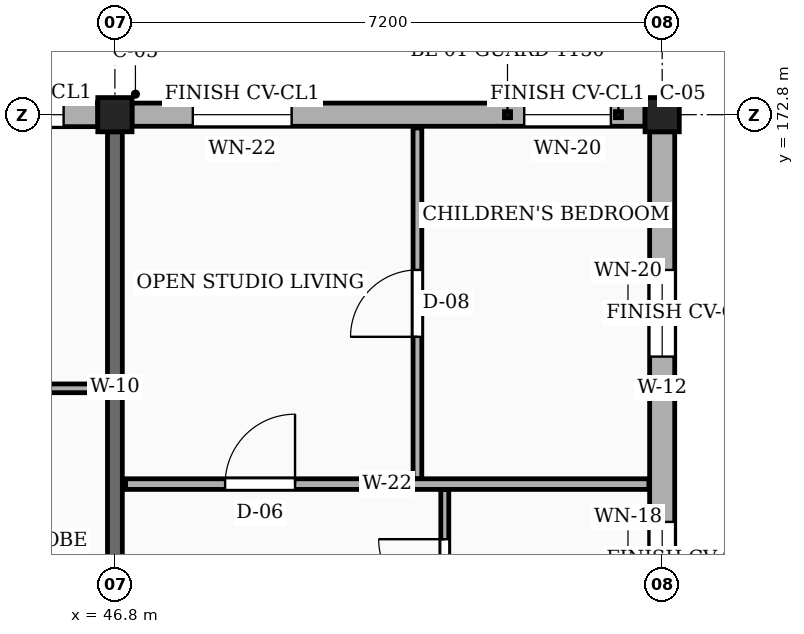
"""IFC4 building model, lengths in metres.
Left out: names, types, materials, properties, quantities, classifications, styles, units other than length and angle.
Written with IfcOpenShell. Run it as: python <this file> out.ifc"""

import sys

from ifc_helpers import new_model, si_unit, direction, frame, frame_2d, origin, origin_2d, place, context, subcontext, project, spatial, rectangle, extrude, element, fill, save


model = new_model("IFC4")
c1 = context("Model", 3, precision=1e-05, world=origin(), true_north=direction((0.0, 1.0)))
c2 = subcontext(c1, "Body", "Model", "MODEL_VIEW")
j1 = project(units=[si_unit("LENGTHUNIT", "METRE"), si_unit("PLANEANGLEUNIT", "RADIAN")], contexts=[c1])
p1 = place(None, origin())
s1 = spatial("IfcSite", under=j1, at=p1, CompositionType="ELEMENT")
p2 = place(p1, origin())
s2 = spatial("IfcBuilding", under=s1, at=p2, CompositionType="ELEMENT")
p3 = place(p2, frame((0.0, 0.0, 39.15)))
s3 = spatial("IfcBuildingStorey", under=s2, at=p3, CompositionType="ELEMENT", Elevation=39.15)
for number, where, z_axis, x_axis in (
    (1, (46.8, 172.8, 0.0), (0.0, 0.0, 1.0), (1.0, 0.0, 0.0)),
    (2, (54.0, 172.8, 0.0), (0.0, 0.0, 1.0), (1.0, 0.0, 0.0)),
):
    element("IfcColumn", number, at=place(p3, frame(where, z_axis=z_axis, x_axis=x_axis)), inside=s3, PredefinedType="COLUMN", context=c2, shape_type="SweptSolid", body=[
        extrude(rectangle(XDim=0.45, YDim=0.45, at=origin_2d()), origin(), (0.0, 0.0, 1.0), 3.15),
    ])
p4 = place(p3, frame((46.8, 165.85, 0.0), z_axis=(0.0, 0.0, 1.0), x_axis=(0.0, 1.0, 0.0)))
e3 = element("IfcWall", 3, at=p4, inside=s3, PredefinedType="SOLIDWALL", context=c2, shape_type="SweptSolid", body=[
    extrude(rectangle(XDim=6.725, YDim=0.195, at=frame_2d((3.362, 0.0))), origin(), (0.0, 0.0, 1.0), 2.185),
])
p5 = place(p3, frame((54.0, 165.825, 0.0), z_axis=(0.0, 0.0, 1.0), x_axis=(0.0, 1.0, 0.0)))
e4 = element("IfcWall", 4, at=p5, inside=s3, PredefinedType="SOLIDWALL", context=c2, shape_type="SweptSolid", body=[
    extrude(rectangle(XDim=6.75, YDim=0.33, at=frame_2d((3.375, 0.0))), origin(), (0.0, 0.0, 1.0), 2.455),
])
p6 = place(p5, frame((0.637, 0.0, 0.78)))
e5 = element("IfcOpeningElement", 5, at=p6, cuts=e4, PredefinedType="OPENING", context=c2, shape_type="SweptSolid", body=[
    extrude(rectangle(XDim=0.98, YDim=1.36, at=frame_2d((0.49, 0.68))), frame((0.0, 0.175, 0.0), z_axis=(0.0, -1.0, 0.0), x_axis=(1.0, 0.0, 0.0)), (0.0, 0.0, 1.0), 0.35),
])
p7 = place(p5, frame((3.792, 0.0, 0.78)))
e6 = element("IfcOpeningElement", 6, at=p7, cuts=e4, PredefinedType="OPENING", context=c2, shape_type="SweptSolid", body=[
    extrude(rectangle(XDim=1.14, YDim=1.36, at=frame_2d((0.57, 0.68))), frame((0.0, 0.175, 0.0), z_axis=(0.0, -1.0, 0.0), x_axis=(1.0, 0.0, 0.0)), (0.0, 0.0, 1.0), 0.35),
])
p8 = place(p3, frame((53.775, 172.8, 0.0), z_axis=(0.0, 0.0, 1.0), x_axis=(-1.0, 0.0, 0.0)))
e7 = element("IfcWall", 7, at=p8, inside=s3, PredefinedType="SOLIDWALL", context=c2, shape_type="SweptSolid", body=[
    extrude(rectangle(XDim=6.75, YDim=0.305, at=frame_2d((3.375, 0.0))), origin(), (0.0, 0.0, 1.0), 2.455),
])
p9 = place(p8, frame((0.45, 0.0, 0.78)))
e8 = element("IfcOpeningElement", 8, at=p9, cuts=e7, PredefinedType="OPENING", context=c2, shape_type="SweptSolid", body=[
    extrude(rectangle(XDim=1.14, YDim=1.36, at=frame_2d((0.57, 0.68))), frame((0.0, 0.163, 0.0), z_axis=(0.0, -1.0, 0.0), x_axis=(1.0, 0.0, 0.0)), (0.0, 0.0, 1.0), 0.325),
])
p10 = place(p8, frame((4.65, 0.0, 0.78)))
e9 = element("IfcOpeningElement", 9, at=p10, cuts=e7, PredefinedType="OPENING", context=c2, shape_type="SweptSolid", body=[
    extrude(rectangle(XDim=1.3, YDim=1.36, at=frame_2d((0.65, 0.68))), frame((0.0, 0.163, 0.0), z_axis=(0.0, -1.0, 0.0), x_axis=(1.0, 0.0, 0.0)), (0.0, 0.0, 1.0), 0.325),
])
p11 = place(p3, frame((46.575, 172.8, 0.0), z_axis=(0.0, 0.0, 1.0), x_axis=(-1.0, 0.0, 0.0)))
e10 = element("IfcWall", 10, at=p11, inside=s3, PredefinedType="SOLIDWALL", context=c2, shape_type="SweptSolid", body=[
    extrude(rectangle(XDim=6.75, YDim=0.315, at=frame_2d((3.375, 0.0))), origin(), (0.0, 0.0, 1.0), 2.455),
])
p12 = place(p11, frame((0.45, 0.0, 0.78)))
e11 = element("IfcOpeningElement", 11, at=p12, cuts=e10, PredefinedType="OPENING", context=c2, shape_type="SweptSolid", body=[
    extrude(rectangle(XDim=1.3, YDim=1.36, at=frame_2d((0.65, 0.68))), frame((0.0, 0.167, 0.0), z_axis=(0.0, -1.0, 0.0), x_axis=(1.0, 0.0, 0.0)), (0.0, 0.0, 1.0), 0.335),
])
p13 = place(p11, frame((4.65, 0.0, 0.78)))
e12 = element("IfcOpeningElement", 12, at=p13, cuts=e10, PredefinedType="OPENING", context=c2, shape_type="SweptSolid", body=[
    extrude(rectangle(XDim=1.46, YDim=1.36, at=frame_2d((0.73, 0.68))), frame((0.0, 0.167, 0.0), z_axis=(0.0, -1.0, 0.0), x_axis=(1.0, 0.0, 0.0)), (0.0, 0.0, 1.0), 0.335),
])
p14 = place(p3, frame((39.74, 169.2, 0.0), z_axis=(0.0, 0.0, 1.0), x_axis=(1.0, 0.0, 0.0)))
e13 = element("IfcWall", 13, at=p14, inside=s3, PredefinedType="PARTITIONING", context=c2, shape_type="SweptSolid", body=[
    extrude(rectangle(XDim=6.92, YDim=0.115, at=frame_2d((3.46, 0.0))), origin(), (0.0, 0.0, 1.0), 2.32),
])
p15 = place(p14, frame((1.05, 0.0, 0.0)))
e14 = element("IfcOpeningElement", 14, at=p15, cuts=e13, PredefinedType="OPENING", context=c2, shape_type="SweptSolid", body=[
    extrude(rectangle(XDim=0.87, YDim=2.05, at=frame_2d((0.435, 1.025))), frame((0.0, 0.067, 0.0), z_axis=(0.0, -1.0, 0.0), x_axis=(1.0, 0.0, 0.0)), (0.0, 0.0, 1.0), 0.135),
])
p16 = place(p14, frame((4.45, 0.0, 0.0)))
e15 = element("IfcOpeningElement", 15, at=p16, cuts=e13, PredefinedType="OPENING", context=c2, shape_type="SweptSolid", body=[
    extrude(rectangle(XDim=0.88, YDim=2.08, at=frame_2d((0.44, 1.04))), frame((0.0, 0.067, 0.0), z_axis=(0.0, -1.0, 0.0), x_axis=(1.0, 0.0, 0.0)), (0.0, 0.0, 1.0), 0.135),
])
p17 = place(p3, frame((50.78, 168.01, 0.0), z_axis=(0.0, 0.0, 1.0), x_axis=(0.0, 1.0, 0.0)))
e16 = element("IfcWall", 16, at=p17, inside=s3, PredefinedType="PARTITIONING", context=c2, shape_type="SweptSolid", body=[
    extrude(rectangle(XDim=4.615, YDim=0.115, at=frame_2d((2.308, 0.0))), origin(), (0.0, 0.0, 1.0), 2.32),
])
p18 = place(p17, frame((1.867, 0.0, 0.0)))
e17 = element("IfcOpeningElement", 17, at=p18, cuts=e16, PredefinedType="OPENING", context=c2, shape_type="SweptSolid", body=[
    extrude(rectangle(XDim=0.88, YDim=2.08, at=frame_2d((0.44, 1.04))), frame((0.0, 0.067, 0.0), z_axis=(0.0, -1.0, 0.0), x_axis=(1.0, 0.0, 0.0)), (0.0, 0.0, 1.0), 0.135),
])
p19 = place(p3, frame((51.14, 165.69, 0.0), z_axis=(0.0, 0.0, 1.0), x_axis=(0.0, 1.0, 0.0)))
e18 = element("IfcWall", 18, at=p19, inside=s3, PredefinedType="PARTITIONING", context=c2, shape_type="SweptSolid", body=[
    extrude(rectangle(XDim=2.18, YDim=0.105, at=frame_2d((1.09, 0.0))), origin(), (0.0, 0.0, 1.0), 2.32),
])
p20 = place(p19, frame((0.655, 0.0, 0.0)))
e19 = element("IfcOpeningElement", 19, at=p20, cuts=e18, PredefinedType="OPENING", context=c2, shape_type="SweptSolid", body=[
    extrude(rectangle(XDim=0.87, YDim=2.05, at=frame_2d((0.435, 1.025))), frame((0.0, 0.062, 0.0), z_axis=(0.0, -1.0, 0.0), x_axis=(1.0, 0.0, 0.0)), (0.0, 0.0, 1.0), 0.125),
])
p21 = place(p3, frame((46.94, 167.94, 0.0), z_axis=(0.0, 0.0, 1.0), x_axis=(1.0, 0.0, 0.0)))
e20 = element("IfcWall", 20, at=p21, inside=s3, PredefinedType="PARTITIONING", context=c2, shape_type="SweptSolid", body=[
    extrude(rectangle(XDim=6.885, YDim=0.14, at=frame_2d((3.442, 0.0))), origin(), (0.0, 0.0, 1.0), 2.32),
])
p22 = place(p21, frame((1.31, 0.0, 0.0)))
e21 = element("IfcOpeningElement", 21, at=p22, cuts=e20, PredefinedType="OPENING", context=c2, shape_type="SweptSolid", body=[
    extrude(rectangle(XDim=0.92, YDim=2.1, at=frame_2d((0.46, 1.05))), frame((0.0, 0.08, 0.0), z_axis=(0.0, -1.0, 0.0), x_axis=(1.0, 0.0, 0.0)), (0.0, 0.0, 1.0), 0.16),
])
p23 = place(p6, origin())
e22 = element("IfcWindow", 22, at=p23, inside=s3, PartitioningType="SINGLE_PANEL", PredefinedType="WINDOW", context=c2, shape_type="SweptSolid", body=[
    extrude(rectangle(XDim=0.98, YDim=1.36, at=frame_2d((0.49, 0.68))), frame((0.0, 0.03, 0.0), z_axis=(0.0, -1.0, 0.0), x_axis=(1.0, 0.0, 0.0)), (0.0, 0.0, 1.0), 0.06),
])
fill(e5, e22)
p24 = place(p7, origin())
e23 = element("IfcWindow", 23, at=p24, inside=s3, PartitioningType="SINGLE_PANEL", PredefinedType="WINDOW", context=c2, shape_type="SweptSolid", body=[
    extrude(rectangle(XDim=1.14, YDim=1.36, at=frame_2d((0.57, 0.68))), frame((0.0, 0.03, 0.0), z_axis=(0.0, -1.0, 0.0), x_axis=(1.0, 0.0, 0.0)), (0.0, 0.0, 1.0), 0.06),
])
fill(e6, e23)
p25 = place(p9, origin())
e24 = element("IfcWindow", 24, at=p25, inside=s3, PartitioningType="SINGLE_PANEL", PredefinedType="WINDOW", context=c2, shape_type="SweptSolid", body=[
    extrude(rectangle(XDim=1.14, YDim=1.36, at=frame_2d((0.57, 0.68))), frame((0.0, 0.03, 0.0), z_axis=(0.0, -1.0, 0.0), x_axis=(1.0, 0.0, 0.0)), (0.0, 0.0, 1.0), 0.06),
])
fill(e8, e24)
p26 = place(p10, origin())
e25 = element("IfcWindow", 25, at=p26, inside=s3, PartitioningType="SINGLE_PANEL", PredefinedType="WINDOW", context=c2, shape_type="SweptSolid", body=[
    extrude(rectangle(XDim=1.3, YDim=1.36, at=frame_2d((0.65, 0.68))), frame((0.0, 0.03, 0.0), z_axis=(0.0, -1.0, 0.0), x_axis=(1.0, 0.0, 0.0)), (0.0, 0.0, 1.0), 0.06),
])
fill(e9, e25)
p27 = place(p12, origin())
e26 = element("IfcWindow", 26, at=p27, inside=s3, PartitioningType="SINGLE_PANEL", PredefinedType="WINDOW", context=c2, shape_type="SweptSolid", body=[
    extrude(rectangle(XDim=1.3, YDim=1.36, at=frame_2d((0.65, 0.68))), frame((0.0, 0.03, 0.0), z_axis=(0.0, -1.0, 0.0), x_axis=(1.0, 0.0, 0.0)), (0.0, 0.0, 1.0), 0.06),
])
fill(e11, e26)
p28 = place(p18, origin())
e27 = element("IfcDoor", 27, at=p28, inside=s3, OperationType="SINGLE_SWING_LEFT", PredefinedType="DOOR", context=c2, shape_type="SweptSolid", body=[
    extrude(rectangle(XDim=0.88, YDim=2.08, at=frame_2d((0.44, 1.04))), frame((0.0, 0.025, 0.0), z_axis=(0.0, -1.0, 0.0), x_axis=(1.0, 0.0, 0.0)), (0.0, 0.0, 1.0), 0.05),
])
fill(e17, e27)
p29 = place(p20, origin())
e28 = element("IfcDoor", 28, at=p29, inside=s3, OperationType="SINGLE_SWING_RIGHT", PredefinedType="DOOR", context=c2, shape_type="SweptSolid", body=[
    extrude(rectangle(XDim=0.87, YDim=2.05, at=frame_2d((0.435, 1.025))), frame((0.0, 0.025, 0.0), z_axis=(0.0, -1.0, 0.0), x_axis=(1.0, 0.0, 0.0)), (0.0, 0.0, 1.0), 0.05),
])
fill(e19, e28)
p30 = place(p22, origin())
e29 = element("IfcDoor", 29, at=p30, inside=s3, OperationType="SINGLE_SWING_RIGHT", PredefinedType="DOOR", context=c2, shape_type="SweptSolid", body=[
    extrude(rectangle(XDim=0.92, YDim=2.1, at=frame_2d((0.46, 1.05))), frame((0.0, 0.025, 0.0), z_axis=(0.0, -1.0, 0.0), x_axis=(1.0, 0.0, 0.0)), (0.0, 0.0, 1.0), 0.05),
])
fill(e21, e29)
save(model, sys.argv[1])
